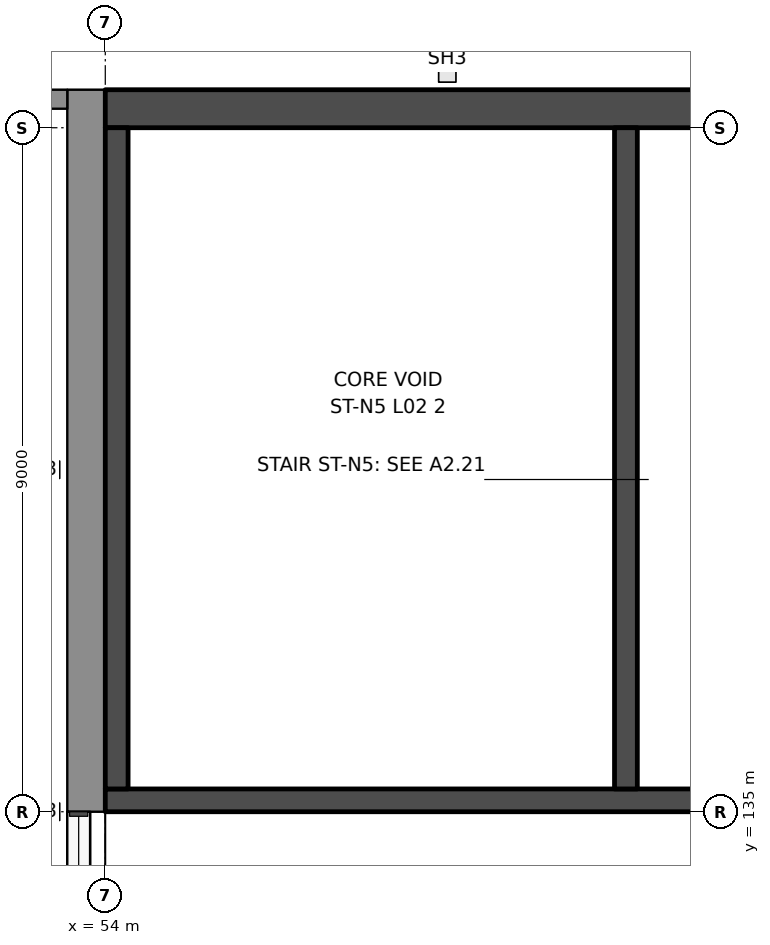
"""IFC4 building model, lengths in metres.
Left out: names, types, materials, properties, quantities, classifications, styles, units other than length and angle.
Written with IfcOpenShell. Run it as: python <this file> out.ifc"""

import sys

from ifc_helpers import new_model, si_unit, direction, frame, frame_2d, origin, place, context, subcontext, project, spatial, rectangle, extrude, element, save


model = new_model("IFC4")
c1 = context("Model", 3, precision=1e-05, world=origin(), true_north=direction((0.0, 1.0)))
c2 = subcontext(c1, "Body", "Model", "MODEL_VIEW")
j1 = project(units=[si_unit("LENGTHUNIT", "METRE"), si_unit("PLANEANGLEUNIT", "RADIAN")], contexts=[c1])
p1 = place(None, origin())
s1 = spatial("IfcSite", under=j1, at=p1, CompositionType="ELEMENT")
p2 = place(p1, origin())
s2 = spatial("IfcBuilding", under=s1, at=p2, CompositionType="ELEMENT")
p3 = place(p2, frame((0.0, 0.0, 11.5)))
s3 = spatial("IfcBuildingStorey", under=s2, at=p3, CompositionType="ELEMENT", Elevation=11.5)
p4 = place(p3, frame((53.65, 135.0, 0.0), z_axis=(0.0, 0.0, 1.0), x_axis=(0.0, -1.0, 0.0)))
e1 = element("IfcWall", 1, at=p4, inside=s3, PredefinedType="SOLIDWALL", context=c2, shape_type="SweptSolid", body=[
    extrude(rectangle(XDim=8.55, YDim=0.3, at=frame_2d((4.275, 0.0))), origin(), (0.0, 0.0, 1.0), 1.0),
])
p5 = place(p3, frame((53.75, 144.5, 0.0), z_axis=(0.0, 0.0, 1.0), x_axis=(0.0, -1.0, 0.0)))
e2 = element("IfcWall", 2, at=p5, inside=s3, PredefinedType="SOLIDWALL", context=c2, shape_type="SweptSolid", body=[
    extrude(rectangle(XDim=9.5, YDim=0.5, at=frame_2d((4.75, 0.0))), origin(), (0.0, 0.0, 1.0), 10.5),
])
p6 = place(p3, frame((53.5, 144.375, 0.0), z_axis=(0.0, 0.0, 1.0), x_axis=(-1.0, 0.0, 0.0)))
e3 = element("IfcWall", 3, at=p6, inside=s3, PredefinedType="PARAPET", context=c2, shape_type="SweptSolid", body=[
    extrude(rectangle(XDim=13.5, YDim=0.25, at=frame_2d((6.75, 0.0))), origin(), (0.0, 0.0, 1.0), 1.2),
])
p7 = place(p3, frame((72.0, 135.15, 0.0), z_axis=(0.0, 0.0, 1.0), x_axis=(-1.0, 0.0, 0.0)))
e4 = element("IfcWall", 4, at=p7, inside=s3, PredefinedType="SHEAR", context=c2, shape_type="SweptSolid", body=[
    extrude(rectangle(XDim=18.0, YDim=0.3, at=frame_2d((9.0, 0.0))), origin(), (0.0, 0.0, 1.0), 10.5),
])
p8 = place(p7, frame((8.6, 0.0, 0.0)))
e5 = element("IfcOpeningElement", 5, at=p8, cuts=e4, PredefinedType="OPENING", context=c2, shape_type="SweptSolid", body=[
    extrude(rectangle(XDim=1.2, YDim=2.1, at=frame_2d((0.6, 1.05))), frame((0.0, 0.16, 0.0), z_axis=(0.0, -1.0, 0.0), x_axis=(1.0, 0.0, 0.0)), (0.0, 0.0, 1.0), 0.32),
])
p9 = place(p3, frame((72.0, 144.25, 0.0), z_axis=(0.0, 0.0, 1.0), x_axis=(-1.0, 0.0, 0.0)))
e6 = element("IfcWall", 6, at=p9, inside=s3, PredefinedType="SHEAR", context=c2, shape_type="SweptSolid", body=[
    extrude(rectangle(XDim=18.0, YDim=0.5, at=frame_2d((9.0, 0.0))), origin(), (0.0, 0.0, 1.0), 10.5),
])
for number, where, z_axis, x_axis in (
    (7, (54.15, 135.3, 0.0), (0.0, 0.0, 1.0), (0.0, 1.0, 0.0)),
    (8, (60.85, 135.3, 0.0), (0.0, 0.0, 1.0), (0.0, 1.0, 0.0)),
):
    element("IfcWall", number, at=place(p3, frame(where, z_axis=z_axis, x_axis=x_axis)), inside=s3, PredefinedType="SHEAR", context=c2, shape_type="SweptSolid", body=[
        extrude(rectangle(XDim=8.7, YDim=0.3, at=frame_2d((4.35, 0.0))), origin(), (0.0, 0.0, 1.0), 10.5),
    ])
save(model, sys.argv[1])
